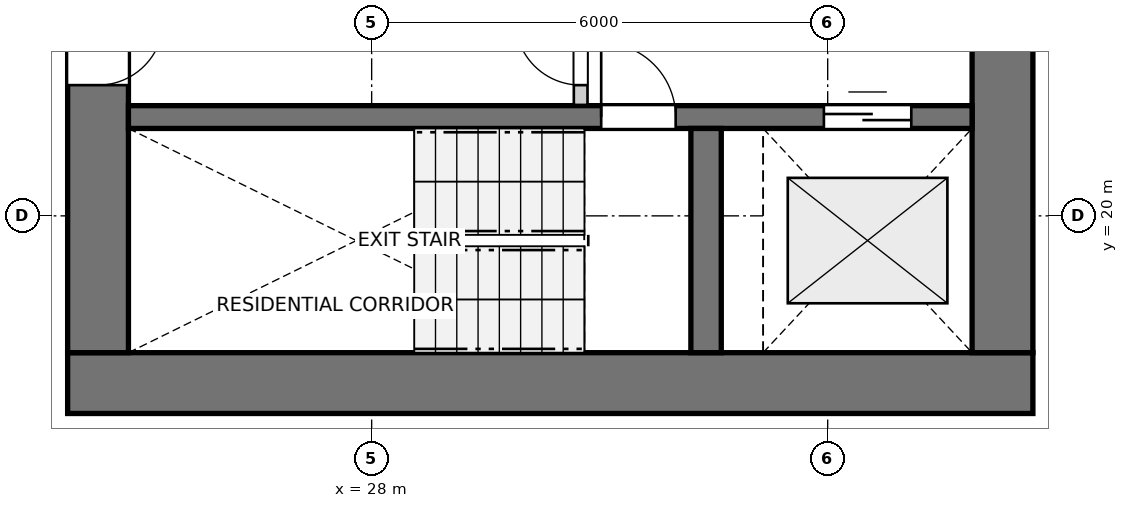
"""IFC4 building model, lengths in metres.
Left out: names, types, materials, properties, quantities, classifications, styles, units other than length and angle.
Written with IfcOpenShell. Run it as: python <this file> out.ifc"""

import sys

from ifc_helpers import new_model, si_unit, direction, frame, frame_2d, origin, place, context, subcontext, project, spatial, rectangle, extrude, source, transform, mapped, element, fill, save


model = new_model("IFC4")
c1 = context("Model", 3, precision=1e-05, world=origin(), true_north=direction((0.0, 1.0)))
c2 = subcontext(c1, "Body", "Model", "MODEL_VIEW")
j1 = project(units=[si_unit("LENGTHUNIT", "METRE"), si_unit("PLANEANGLEUNIT", "RADIAN")], contexts=[c1])
p1 = place(None, origin())
s1 = spatial("IfcSite", under=j1, at=p1, CompositionType="ELEMENT")
p2 = place(p1, origin())
s2 = spatial("IfcBuilding", under=s1, at=p2, CompositionType="ELEMENT")
p3 = place(p2, frame((0.0, 0.0, 43.0)))
s3 = spatial("IfcBuildingStorey", under=s2, at=p3, CompositionType="ELEMENT", Elevation=43.0)
p4 = place(p3, frame((24.0, 17.8, 0.0), z_axis=(0.0, 0.0, 1.0), x_axis=(1.0, 0.0, 0.0)))
e1 = element("IfcWall", 1, at=p4, inside=s3, PredefinedType="SHEAR", context=c2, shape_type="SweptSolid", body=[
    extrude(rectangle(XDim=12.7, YDim=0.8, at=frame_2d((6.35, 0.0))), origin(), (0.0, 0.0, 1.0), 2.94),
])
p5 = place(p3, frame((24.4, 33.8, 0.0), z_axis=(0.0, 0.0, 1.0), x_axis=(0.0, -1.0, 0.0)))
e2 = element("IfcWall", 2, at=p5, inside=s3, PredefinedType="SHEAR", context=c2, shape_type="SweptSolid", body=[
    extrude(rectangle(XDim=15.6, YDim=0.8, at=frame_2d((7.8, 0.0))), origin(), (0.0, 0.0, 1.0), 2.94),
])
p6 = place(p5, frame((7.05, 0.0, 0.0)))
e3 = element("IfcOpeningElement", 3, at=p6, cuts=e2, PredefinedType="OPENING", context=c2, shape_type="SweptSolid", body=[
    extrude(rectangle(XDim=1.5, YDim=2.15, at=frame_2d((0.75, 1.075))), frame((0.0, 0.41, 0.0), z_axis=(0.0, -1.0, 0.0), x_axis=(1.0, 0.0, 0.0)), (0.0, 0.0, 1.0), 0.82),
])
p7 = place(p5, frame((3.52, 0.0, 0.0)))
e4 = element("IfcOpeningElement", 4, at=p7, cuts=e2, PredefinedType="OPENING", context=c2, shape_type="SweptSolid", body=[
    extrude(rectangle(XDim=0.86, YDim=2.05, at=frame_2d((0.43, 1.025))), frame((0.0, 0.41, 0.0), z_axis=(0.0, -1.0, 0.0), x_axis=(1.0, 0.0, 0.0)), (0.0, 0.0, 1.0), 0.82),
])
p8 = place(p5, frame((11.22, 0.0, 0.0)))
e5 = element("IfcOpeningElement", 5, at=p8, cuts=e2, PredefinedType="OPENING", context=c2, shape_type="SweptSolid", body=[
    extrude(rectangle(XDim=0.86, YDim=2.05, at=frame_2d((0.43, 1.025))), frame((0.0, 0.41, 0.0), z_axis=(0.0, -1.0, 0.0), x_axis=(1.0, 0.0, 0.0)), (0.0, 0.0, 1.0), 0.82),
])
p9 = place(p3, frame((36.3, 18.2, 0.0), z_axis=(0.0, 0.0, 1.0), x_axis=(0.0, 1.0, 0.0)))
e6 = element("IfcWall", 6, at=p9, inside=s3, PredefinedType="SHEAR", context=c2, shape_type="SweptSolid", body=[
    extrude(rectangle(XDim=15.6, YDim=0.8, at=frame_2d((7.8, 0.0))), origin(), (0.0, 0.0, 1.0), 2.94),
])
p10 = place(p9, frame((4.25, 0.0, 0.0)))
e7 = element("IfcOpeningElement", 7, at=p10, cuts=e6, PredefinedType="OPENING", context=c2, shape_type="SweptSolid", body=[
    extrude(rectangle(XDim=1.1, YDim=2.15, at=frame_2d((0.55, 1.075))), frame((0.0, 0.41, 0.0), z_axis=(0.0, -1.0, 0.0), x_axis=(1.0, 0.0, 0.0)), (0.0, 0.0, 1.0), 0.82),
])
p11 = place(p9, frame((10.25, 0.0, 0.0)))
e8 = element("IfcOpeningElement", 8, at=p11, cuts=e6, PredefinedType="OPENING", context=c2, shape_type="SweptSolid", body=[
    extrude(rectangle(XDim=1.1, YDim=2.15, at=frame_2d((0.55, 1.075))), frame((0.0, 0.41, 0.0), z_axis=(0.0, -1.0, 0.0), x_axis=(1.0, 0.0, 0.0)), (0.0, 0.0, 1.0), 0.82),
])
p12 = place(p3, frame((24.8, 21.3, 0.0), z_axis=(0.0, 0.0, 1.0), x_axis=(1.0, 0.0, 0.0)))
e9 = element("IfcWall", 9, at=p12, inside=s3, PredefinedType="SHEAR", context=c2, shape_type="SweptSolid", body=[
    extrude(rectangle(XDim=11.1, YDim=0.3, at=frame_2d((5.55, 0.0))), origin(), (0.0, 0.0, 1.0), 2.94),
])
p13 = place(p12, frame((6.22, 0.0, 0.0)))
e10 = element("IfcOpeningElement", 10, at=p13, cuts=e9, PredefinedType="OPENING", context=c2, shape_type="SweptSolid", body=[
    extrude(rectangle(XDim=0.98, YDim=2.15, at=frame_2d((0.49, 1.075))), frame((0.0, 0.16, 0.0), z_axis=(0.0, -1.0, 0.0), x_axis=(1.0, 0.0, 0.0)), (0.0, 0.0, 1.0), 0.32),
])
p14 = place(p12, frame((9.15, 0.0, 0.0)))
e11 = element("IfcOpeningElement", 11, at=p14, cuts=e9, PredefinedType="OPENING", context=c2, shape_type="SweptSolid", body=[
    extrude(rectangle(XDim=1.15, YDim=2.15, at=frame_2d((0.575, 1.075))), frame((0.0, 0.16, 0.0), z_axis=(0.0, -1.0, 0.0), x_axis=(1.0, 0.0, 0.0)), (0.0, 0.0, 1.0), 0.32),
])
p15 = place(p3, frame((32.4, 18.2, 0.0), z_axis=(0.0, 0.0, 1.0), x_axis=(0.0, 1.0, 0.0)))
e12 = element("IfcWall", 12, at=p15, inside=s3, PredefinedType="SHEAR", context=c2, shape_type="SweptSolid", body=[
    extrude(rectangle(XDim=2.95, YDim=0.4, at=frame_2d((1.475, 0.0))), origin(), (0.0, 0.0, 1.0), 2.94),
])
p16 = place(p3, frame((30.75, 21.46, 0.0), z_axis=(0.0, 0.0, 1.0), x_axis=(0.0, 1.0, 0.0)))
e13 = element("IfcWall", 13, at=p16, inside=s3, PredefinedType="PARTITIONING", context=c2, shape_type="SweptSolid", body=[
    extrude(rectangle(XDim=3.11, YDim=0.18, at=frame_2d((1.555, 0.0))), origin(), (0.0, 0.0, 1.0), 2.94),
])
p17 = place(p16, frame((0.26, 0.0, 0.0)))
e14 = element("IfcOpeningElement", 14, at=p17, cuts=e13, PredefinedType="OPENING", context=c2, shape_type="SweptSolid", body=[
    extrude(rectangle(XDim=0.86, YDim=2.05, at=frame_2d((0.43, 1.025))), frame((0.0, 0.1, 0.0), z_axis=(0.0, -1.0, 0.0), x_axis=(1.0, 0.0, 0.0)), (0.0, 0.0, 1.0), 0.2),
])
m1 = source(origin(), c2, "Body", "SweptSolid", [
    extrude(rectangle(XDim=0.98, YDim=2.15, at=frame_2d((0.49, 1.075))), frame((0.0, 0.025, 0.0), z_axis=(0.0, -1.0, 0.0), x_axis=(1.0, 0.0, 0.0)), (0.0, 0.0, 1.0), 0.05),
])
p18 = place(p13, origin())
e15 = element("IfcDoor", 15, at=p18, inside=s3, OperationType="SINGLE_SWING_LEFT", PredefinedType="DOOR", context=c2, shape_type="MappedRepresentation", body=[
    mapped(m1, transform((0.0, 0.0, 0.0), x_axis=(1.0, 0.0, 0.0), y_axis=(0.0, 1.0, 0.0), z_axis=(0.0, 0.0, 1.0), scale=1.0)),
])
fill(e10, e15)
m2 = source(origin(), c2, "Body", "SweptSolid", [
    extrude(rectangle(XDim=1.15, YDim=2.15, at=frame_2d((0.575, 1.075))), frame((0.0, 0.025, 0.0), z_axis=(0.0, -1.0, 0.0), x_axis=(1.0, 0.0, 0.0)), (0.0, 0.0, 1.0), 0.05),
])
p19 = place(p14, origin())
e16 = element("IfcDoor", 16, at=p19, inside=s3, OperationType="DOUBLE_DOOR_SLIDING", PredefinedType="DOOR", context=c2, shape_type="MappedRepresentation", body=[
    mapped(m2, transform((0.0, 0.0, 0.0), x_axis=(1.0, 0.0, 0.0), y_axis=(0.0, 1.0, 0.0), z_axis=(0.0, 0.0, 1.0), scale=1.0)),
])
fill(e11, e16)
m3 = source(origin(), c2, "Body", "SweptSolid", [
    extrude(rectangle(XDim=0.86, YDim=2.05, at=frame_2d((0.43, 1.025))), frame((0.0, 0.025, 0.0), z_axis=(0.0, -1.0, 0.0), x_axis=(1.0, 0.0, 0.0)), (0.0, 0.0, 1.0), 0.05),
])
p20 = place(p8, origin())
e17 = element("IfcDoor", 17, at=p20, inside=s3, OperationType="SINGLE_SWING_LEFT", PredefinedType="DOOR", context=c2, shape_type="MappedRepresentation", body=[
    mapped(m3, transform((0.0, 0.0, 0.0), x_axis=(1.0, 0.0, 0.0), y_axis=(0.0, 1.0, 0.0), z_axis=(0.0, 0.0, 1.0), scale=1.0)),
])
fill(e5, e17)
p21 = place(p17, origin())
e18 = element("IfcDoor", 18, at=p21, inside=s3, OperationType="SINGLE_SWING_RIGHT", PredefinedType="DOOR", context=c2, shape_type="MappedRepresentation", body=[
    mapped(m3, transform((0.0, 0.0, 0.0), x_axis=(1.0, 0.0, 0.0), y_axis=(0.0, 1.0, 0.0), z_axis=(0.0, 0.0, 1.0), scale=1.0)),
])
fill(e14, e18)
save(model, sys.argv[1])
